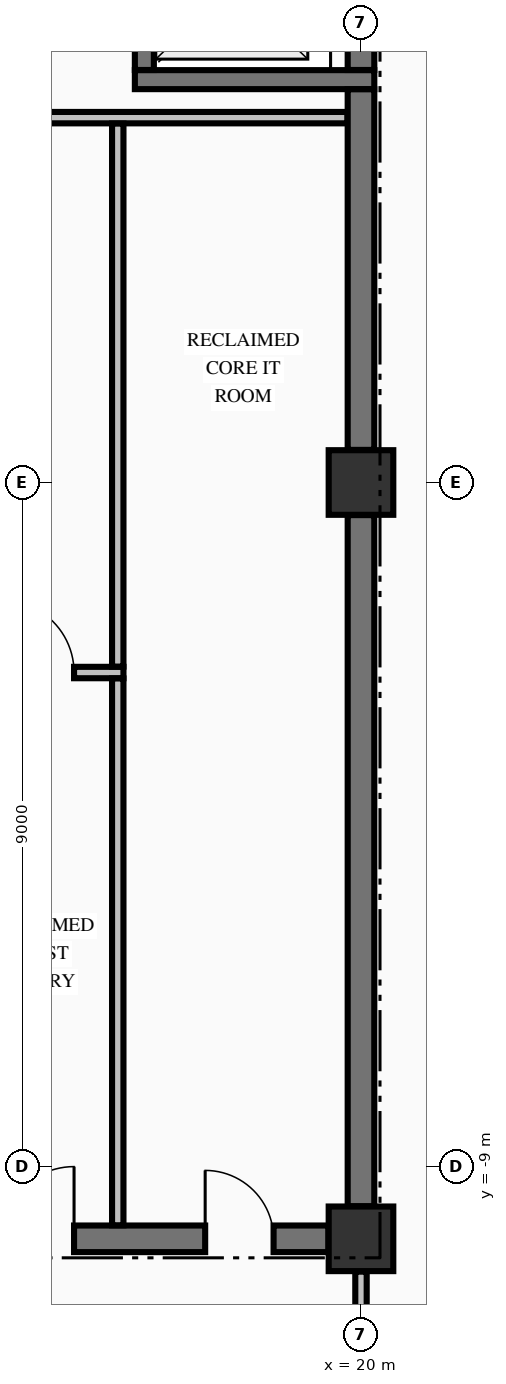
"""IFC4 building model, lengths in metres.
Left out: names, types, materials, properties, quantities, classifications, styles, units other than length and angle.
Written with IfcOpenShell. Run it as: python <this file> out.ifc"""

import sys

from ifc_helpers import new_model, si_unit, direction, frame, frame_2d, origin, origin_2d, place, context, subcontext, project, spatial, rectangle, extrude, element, fill, save


model = new_model("IFC4")
c1 = context("Model", 3, precision=1e-05, world=origin(), true_north=direction((0.0, 1.0)))
c2 = subcontext(c1, "Body", "Model", "MODEL_VIEW")
j1 = project(units=[si_unit("LENGTHUNIT", "METRE"), si_unit("PLANEANGLEUNIT", "RADIAN")], contexts=[c1])
p1 = place(None, origin())
s1 = spatial("IfcSite", under=j1, at=p1, CompositionType="ELEMENT")
p2 = place(p1, origin())
s2 = spatial("IfcBuilding", under=s1, at=p2, CompositionType="ELEMENT")
p3 = place(p2, frame((0.0, 0.0, 205.06)))
s3 = spatial("IfcBuildingStorey", under=s2, at=p3, CompositionType="ELEMENT", Elevation=205.06)
for number, where, z_axis, x_axis in (
    (1, (20.0, -9.95, -0.25), (0.0, 0.0, 1.0), (1.0, 0.0, 0.0)),
    (2, (20.0, 0.0, -0.25), (0.0, 0.0, 1.0), (1.0, 0.0, 0.0)),
):
    element("IfcColumn", number, at=place(p3, frame(where, z_axis=z_axis, x_axis=x_axis)), inside=s3, PredefinedType="COLUMN", context=c2, shape_type="SweptSolid", body=[
        extrude(rectangle(XDim=0.85, YDim=0.85, at=origin_2d()), origin(), (0.0, 0.0, 1.0), 3.4),
    ])
p4 = place(p3, frame((14.7, -9.95, 0.0), z_axis=(0.0, 0.0, 1.0), x_axis=(1.0, 0.0, 0.0)))
e3 = element("IfcWall", 3, at=p4, inside=s3, PredefinedType="SHEAR", context=c2, shape_type="SweptSolid", body=[
    extrude(rectangle(XDim=4.871, YDim=0.35, at=frame_2d((2.436, 0.0))), origin(), (0.0, 0.0, 1.0), 3.15),
])
p5 = place(p4, frame((3.25, 0.0, 0.0)))
e4 = element("IfcOpeningElement", 4, at=p5, cuts=e3, PredefinedType="OPENING", context=c2, shape_type="SweptSolid", body=[
    extrude(rectangle(XDim=0.9, YDim=2.15, at=frame_2d((0.45, 1.075))), frame((0.0, 0.185, 0.0), z_axis=(0.0, -1.0, 0.0), x_axis=(1.0, 0.0, 0.0)), (0.0, 0.0, 1.0), 0.37),
])
p6 = place(p4, frame((0.575, 0.0, 0.0)))
e5 = element("IfcOpeningElement", 5, at=p6, cuts=e3, PredefinedType="OPENING", context=c2, shape_type="SweptSolid", body=[
    extrude(rectangle(XDim=0.95, YDim=2.15, at=frame_2d((0.475, 1.075))), frame((0.0, 0.185, 0.0), z_axis=(0.0, -1.0, 0.0), x_axis=(1.0, 0.0, 0.0)), (0.0, 0.0, 1.0), 0.37),
])
p7 = place(p3, frame((17.025, 5.3, 0.0), z_axis=(0.0, 0.0, 1.0), x_axis=(1.0, 0.0, 0.0)))
e6 = element("IfcWall", 6, at=p7, inside=s3, PredefinedType="SOLIDWALL", context=c2, shape_type="SweptSolid", body=[
    extrude(rectangle(XDim=3.15, YDim=0.25, at=frame_2d((1.575, 0.0))), origin(), (0.0, 0.0, 1.0), 3.15),
])
p8 = place(p3, frame((14.878, -2.5, 0.0), z_axis=(0.0, 0.0, 1.0), x_axis=(1.0, 0.0, 0.0)))
e7 = element("IfcWall", 7, at=p8, inside=s3, PredefinedType="PARTITIONING", context=c2, shape_type="SweptSolid", body=[
    extrude(rectangle(XDim=1.997, YDim=0.15, at=frame_2d((0.999, 0.0))), origin(), (0.0, 0.0, 1.0), 3.15),
])
p9 = place(p8, frame((0.397, 0.0, 0.0)))
e8 = element("IfcOpeningElement", 8, at=p9, cuts=e7, PredefinedType="OPENING", context=c2, shape_type="SweptSolid", body=[
    extrude(rectangle(XDim=0.95, YDim=2.15, at=frame_2d((0.475, 1.075))), frame((0.0, 0.085, 0.0), z_axis=(0.0, -1.0, 0.0), x_axis=(1.0, 0.0, 0.0)), (0.0, 0.0, 1.0), 0.17),
])
p10 = place(p3, frame((14.878, 4.8, 0.0), z_axis=(0.0, 0.0, 1.0), x_axis=(1.0, 0.0, 0.0)))
e9 = element("IfcWall", 9, at=p10, inside=s3, PredefinedType="PARTITIONING", context=c2, shape_type="SweptSolid", body=[
    extrude(rectangle(XDim=4.944, YDim=0.15, at=frame_2d((2.472, 0.0))), origin(), (0.0, 0.0, 1.0), 3.15),
])
p11 = place(p3, frame((17.15, 5.427, 0.0), z_axis=(0.0, 0.0, 1.0), x_axis=(0.0, 1.0, 0.0)))
e10 = element("IfcWall", 10, at=p11, inside=s3, PredefinedType="SOLIDWALL", context=c2, shape_type="SweptSolid", body=[
    extrude(rectangle(XDim=2.196, YDim=0.25, at=frame_2d((1.098, 0.0))), origin(), (0.0, 0.0, 1.0), 3.15),
])
p12 = place(p11, frame((0.548, 0.0, 0.0)))
e11 = element("IfcOpeningElement", 11, at=p12, cuts=e10, PredefinedType="OPENING", context=c2, shape_type="SweptSolid", body=[
    extrude(rectangle(XDim=1.1, YDim=2.2, at=frame_2d((0.55, 1.1))), frame((0.0, 0.135, 0.0), z_axis=(0.0, -1.0, 0.0), x_axis=(1.0, 0.0, 0.0)), (0.0, 0.0, 1.0), 0.27),
])
p13 = place(p3, frame((20.0, -9.521, 0.0), z_axis=(0.0, 0.0, 1.0), x_axis=(0.0, 1.0, 0.0)))
e12 = element("IfcWall", 12, at=p13, inside=s3, PredefinedType="SHEAR", context=c2, shape_type="SweptSolid", body=[
    extrude(rectangle(XDim=9.092, YDim=0.35, at=frame_2d((4.546, 0.0))), origin(), (0.0, 0.0, 1.0), 3.15),
])
p14 = place(p3, frame((20.0, 0.429, 0.0), z_axis=(0.0, 0.0, 1.0), x_axis=(0.0, 1.0, 0.0)))
e13 = element("IfcWall", 13, at=p14, inside=s3, PredefinedType="SHEAR", context=c2, shape_type="SweptSolid", body=[
    extrude(rectangle(XDim=4.744, YDim=0.35, at=frame_2d((2.372, 0.0))), origin(), (0.0, 0.0, 1.0), 3.15),
])
p15 = place(p3, frame((20.0, 5.427, 0.0), z_axis=(0.0, 0.0, 1.0), x_axis=(0.0, 1.0, 0.0)))
e14 = element("IfcWall", 14, at=p15, inside=s3, PredefinedType="SHEAR", context=c2, shape_type="SweptSolid", body=[
    extrude(rectangle(XDim=2.196, YDim=0.35, at=frame_2d((1.098, 0.0))), origin(), (0.0, 0.0, 1.0), 3.15),
])
p16 = place(p3, frame((16.8, -9.772, 0.0), z_axis=(0.0, 0.0, 1.0), x_axis=(0.0, 1.0, 0.0)))
e15 = element("IfcWall", 15, at=p16, inside=s3, PredefinedType="PARTITIONING", context=c2, shape_type="SweptSolid", body=[
    extrude(rectangle(XDim=7.194, YDim=0.15, at=frame_2d((3.597, 0.0))), origin(), (0.0, 0.0, 1.0), 3.15),
])
p17 = place(p3, frame((16.8, -2.422, 0.0), z_axis=(0.0, 0.0, 1.0), x_axis=(0.0, 1.0, 0.0)))
e16 = element("IfcWall", 16, at=p17, inside=s3, PredefinedType="PARTITIONING", context=c2, shape_type="SweptSolid", body=[
    extrude(rectangle(XDim=7.144, YDim=0.15, at=frame_2d((3.572, 0.0))), origin(), (0.0, 0.0, 1.0), 3.15),
])
p18 = place(p3, frame((20.0, -12.472, 0.0), z_axis=(0.0, 0.0, 1.0), x_axis=(0.0, 1.0, 0.0)))
e17 = element("IfcWall", 17, at=p18, inside=s3, PredefinedType="PARTITIONING", context=c2, shape_type="SweptSolid", body=[
    extrude(rectangle(XDim=2.091, YDim=0.15, at=frame_2d((1.045, 0.0))), origin(), (0.0, 0.0, 1.0), 2.342),
])
p19 = place(p5, origin())
e18 = element("IfcDoor", 18, at=p19, inside=s3, OperationType="SINGLE_SWING_LEFT", PredefinedType="DOOR", context=c2, shape_type="SweptSolid", body=[
    extrude(rectangle(XDim=0.9, YDim=2.15, at=frame_2d((0.45, 1.075))), frame((0.0, 0.025, 0.0), z_axis=(0.0, -1.0, 0.0), x_axis=(1.0, 0.0, 0.0)), (0.0, 0.0, 1.0), 0.05),
])
fill(e4, e18)
p20 = place(p6, origin())
e19 = element("IfcDoor", 19, at=p20, inside=s3, OperationType="SINGLE_SWING_RIGHT", PredefinedType="DOOR", context=c2, shape_type="SweptSolid", body=[
    extrude(rectangle(XDim=0.95, YDim=2.15, at=frame_2d((0.475, 1.075))), frame((0.0, 0.025, 0.0), z_axis=(0.0, -1.0, 0.0), x_axis=(1.0, 0.0, 0.0)), (0.0, 0.0, 1.0), 0.05),
])
fill(e5, e19)
p21 = place(p9, origin())
e20 = element("IfcDoor", 20, at=p21, inside=s3, OperationType="SINGLE_SWING_LEFT", PredefinedType="DOOR", context=c2, shape_type="SweptSolid", body=[
    extrude(rectangle(XDim=0.95, YDim=2.15, at=frame_2d((0.475, 1.075))), frame((0.0, 0.025, 0.0), z_axis=(0.0, -1.0, 0.0), x_axis=(1.0, 0.0, 0.0)), (0.0, 0.0, 1.0), 0.05),
])
fill(e8, e20)
save(model, sys.argv[1])
